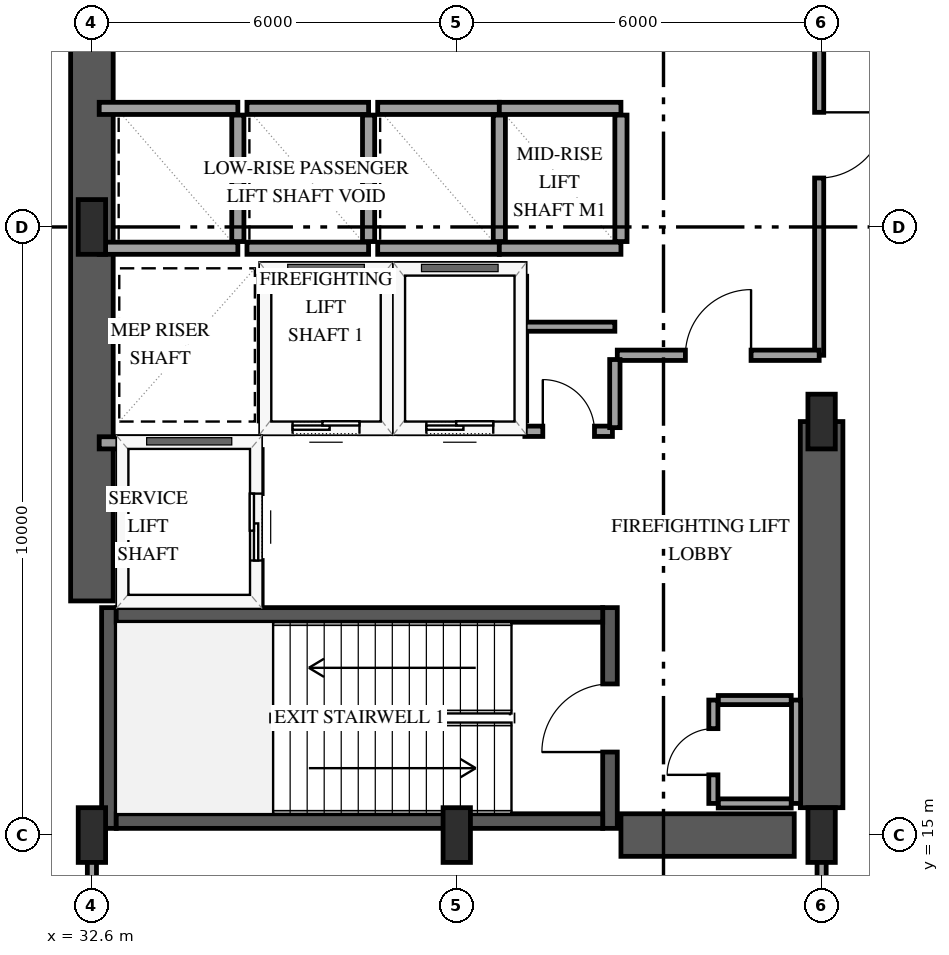
"""IFC4 building model, lengths in metres.
Left out: names, types, materials, properties, quantities, classifications, styles, units other than length and angle.
Written with IfcOpenShell. Run it as: python <this file> out.ifc"""

import sys

from ifc_helpers import new_model, si_unit, direction, frame, frame_2d, origin, origin_2d, place, context, subcontext, project, spatial, rectangle, extrude, element, fill, save


model = new_model("IFC4")
c1 = context("Model", 3, precision=1e-05, world=origin(), true_north=direction((0.0, 1.0)))
c2 = subcontext(c1, "Body", "Model", "MODEL_VIEW")
j1 = project(units=[si_unit("LENGTHUNIT", "METRE"), si_unit("PLANEANGLEUNIT", "RADIAN")], contexts=[c1])
p1 = place(None, origin())
s1 = spatial("IfcSite", under=j1, at=p1, CompositionType="ELEMENT")
p2 = place(p1, origin())
s2 = spatial("IfcBuilding", under=s1, at=p2, CompositionType="ELEMENT")
p3 = place(p2, frame((0.0, 0.0, 25.2)))
s3 = spatial("IfcBuildingStorey", under=s2, at=p3, CompositionType="ELEMENT", Elevation=25.2)
p4 = place(p3, frame((32.88, 15.11, 0.0), z_axis=(0.0, 0.0, 1.0), x_axis=(0.0, 1.0, 0.0)))
e1 = element("IfcWall", 1, at=p4, inside=s3, PredefinedType="SHEAR", context=c2, shape_type="SweptSolid", body=[
    extrude(rectangle(XDim=3.63, YDim=0.24, at=frame_2d((1.815, 0.0))), origin(), (0.0, 0.0, 1.0), 5.4),
])
p5 = place(p3, frame((41.12, 15.11, 0.0), z_axis=(0.0, 0.0, 1.0), x_axis=(0.0, 1.0, 0.0)))
e2 = element("IfcWall", 2, at=p5, inside=s3, PredefinedType="SHEAR", context=c2, shape_type="SweptSolid", body=[
    extrude(rectangle(XDim=3.63, YDim=0.24, at=frame_2d((1.815, 0.0))), origin(), (0.0, 0.0, 1.0), 5.4),
])
p6 = place(p5, frame((1.255, 0.0, 0.0)))
e3 = element("IfcOpeningElement", 3, at=p6, cuts=e2, PredefinedType="OPENING", context=c2, shape_type="SweptSolid", body=[
    extrude(rectangle(XDim=1.12, YDim=2.15, at=frame_2d((0.56, 1.075))), frame((0.0, 0.13, 0.0), z_axis=(0.0, -1.0, 0.0), x_axis=(1.0, 0.0, 0.0)), (0.0, 0.0, 1.0), 0.26),
])
for number, where, z_axis, x_axis in (
    (4, (33.0, 15.23, 0.0), (0.0, 0.0, 1.0), (1.0, 0.0, 0.0)),
    (5, (33.0, 18.62, 0.0), (0.0, 0.0, 1.0), (1.0, 0.0, 0.0)),
):
    element("IfcWall", number, at=place(p3, frame(where, z_axis=z_axis, x_axis=x_axis)), inside=s3, PredefinedType="SHEAR", context=c2, shape_type="SweptSolid", body=[
        extrude(rectangle(XDim=8.0, YDim=0.24, at=frame_2d((4.0, 0.0))), origin(), (0.0, 0.0, 1.0), 5.4),
    ])
p7 = place(p3, frame((32.6, 18.85, 0.0), z_axis=(0.0, 0.0, 1.0), x_axis=(0.0, 1.0, 0.0)))
e6 = element("IfcWall", 6, at=p7, inside=s3, PredefinedType="SHEAR", context=c2, shape_type="SweptSolid", body=[
    extrude(rectangle(XDim=12.3, YDim=0.7, at=frame_2d((6.15, 0.0))), origin(), (0.0, 0.0, 1.0), 5.4),
])
p8 = place(p3, frame((41.3, 15.0, 0.0), z_axis=(0.0, 0.0, 1.0), x_axis=(1.0, 0.0, 0.0)))
e7 = element("IfcWall", 7, at=p8, inside=s3, PredefinedType="SHEAR", context=c2, shape_type="SweptSolid", body=[
    extrude(rectangle(XDim=2.85, YDim=0.7, at=frame_2d((1.425, 0.0))), origin(), (0.0, 0.0, 1.0), 5.4),
])
p9 = place(p3, frame((44.6, 15.45, 0.0), z_axis=(0.0, 0.0, 1.0), x_axis=(0.0, 1.0, 0.0)))
e8 = element("IfcWall", 8, at=p9, inside=s3, PredefinedType="SHEAR", context=c2, shape_type="SweptSolid", body=[
    extrude(rectangle(XDim=6.35, YDim=0.7, at=frame_2d((3.175, 0.0))), origin(), (0.0, 0.0, 1.0), 5.4),
])
for number, where, z_axis, x_axis in (
    (9, (32.6, 15.0, 0.0), (0.0, 0.0, 1.0), (1.0, 0.0, 0.0)),
    (10, (32.6, 25.0, 0.0), (0.0, 0.0, 1.0), (1.0, 0.0, 0.0)),
    (11, (38.6, 15.0, 0.0), (0.0, 0.0, 1.0), (1.0, 0.0, 0.0)),
    (12, (44.6, 15.0, 0.0), (0.0, 0.0, 1.0), (1.0, 0.0, 0.0)),
    (13, (44.6, 21.8, 0.0), (0.0, 0.0, 1.0), (1.0, 0.0, 0.0)),
):
    element("IfcColumn", number, at=place(p3, frame(where, z_axis=z_axis, x_axis=x_axis)), inside=s3, PredefinedType="PILASTER", context=c2, shape_type="SweptSolid", body=[
        extrude(rectangle(XDim=0.45, YDim=0.9, at=origin_2d()), origin(), (0.0, 0.0, 1.0), 5.1),
    ])
p10 = place(p3, frame((35.45, 21.7, 0.0), z_axis=(0.0, 0.0, 1.0), x_axis=(1.0, 0.0, 0.0)))
e14 = element("IfcWall", 14, at=p10, inside=s3, PredefinedType="SOLIDWALL", context=c2, shape_type="SweptSolid", body=[
    extrude(rectangle(XDim=2.0, YDim=0.2, at=frame_2d((1.0, 0.0))), origin(), (0.0, 0.0, 1.0), 5.1),
])
p11 = place(p10, frame((0.45, 0.0, 0.0)))
e15 = element("IfcOpeningElement", 15, at=p11, cuts=e14, PredefinedType="OPENING", context=c2, shape_type="SweptSolid", body=[
    extrude(rectangle(XDim=1.1, YDim=2.15, at=frame_2d((0.55, 1.075))), frame((0.0, 0.11, 0.0), z_axis=(0.0, -1.0, 0.0), x_axis=(1.0, 0.0, 0.0)), (0.0, 0.0, 1.0), 0.22),
])
p12 = place(p3, frame((35.45, 24.3, 0.0), z_axis=(0.0, 0.0, 1.0), x_axis=(1.0, 0.0, 0.0)))
e16 = element("IfcWall", 16, at=p12, inside=s3, PredefinedType="SOLIDWALL", context=c2, shape_type="SweptSolid", body=[
    extrude(rectangle(XDim=2.0, YDim=0.2, at=frame_2d((1.0, 0.0))), origin(), (0.0, 0.0, 1.0), 5.1),
])
for number, where, z_axis, x_axis in (
    (17, (35.45, 21.81, 0.0), (0.0, 0.0, 1.0), (0.0, 1.0, 0.0)),
    (18, (37.45, 21.81, 0.0), (0.0, 0.0, 1.0), (0.0, 1.0, 0.0)),
):
    element("IfcWall", number, at=place(p3, frame(where, z_axis=z_axis, x_axis=x_axis)), inside=s3, PredefinedType="SOLIDWALL", context=c2, shape_type="SweptSolid", body=[
        extrude(rectangle(XDim=2.38, YDim=0.2, at=frame_2d((1.19, 0.0))), origin(), (0.0, 0.0, 1.0), 5.1),
    ])
p13 = place(p3, frame((37.65, 21.7, 0.0), z_axis=(0.0, 0.0, 1.0), x_axis=(1.0, 0.0, 0.0)))
e19 = element("IfcWall", 19, at=p13, inside=s3, PredefinedType="SOLIDWALL", context=c2, shape_type="SweptSolid", body=[
    extrude(rectangle(XDim=2.0, YDim=0.2, at=frame_2d((1.0, 0.0))), origin(), (0.0, 0.0, 1.0), 5.1),
])
p14 = place(p13, frame((0.45, 0.0, 0.0)))
e20 = element("IfcOpeningElement", 20, at=p14, cuts=e19, PredefinedType="OPENING", context=c2, shape_type="SweptSolid", body=[
    extrude(rectangle(XDim=1.1, YDim=2.15, at=frame_2d((0.55, 1.075))), frame((0.0, 0.11, 0.0), z_axis=(0.0, -1.0, 0.0), x_axis=(1.0, 0.0, 0.0)), (0.0, 0.0, 1.0), 0.22),
])
p15 = place(p3, frame((37.65, 24.3, 0.0), z_axis=(0.0, 0.0, 1.0), x_axis=(1.0, 0.0, 0.0)))
e21 = element("IfcWall", 21, at=p15, inside=s3, PredefinedType="SOLIDWALL", context=c2, shape_type="SweptSolid", body=[
    extrude(rectangle(XDim=2.0, YDim=0.2, at=frame_2d((1.0, 0.0))), origin(), (0.0, 0.0, 1.0), 5.1),
])
p16 = place(p3, frame((39.65, 21.81, 0.0), z_axis=(0.0, 0.0, 1.0), x_axis=(0.0, 1.0, 0.0)))
e22 = element("IfcWall", 22, at=p16, inside=s3, PredefinedType="SOLIDWALL", context=c2, shape_type="SweptSolid", body=[
    extrude(rectangle(XDim=2.38, YDim=0.2, at=frame_2d((1.19, 0.0))), origin(), (0.0, 0.0, 1.0), 5.1),
])
p17 = place(p3, frame((32.72, 21.45, 0.0), z_axis=(0.0, 0.0, 1.0), x_axis=(1.0, 0.0, 0.0)))
e23 = element("IfcWall", 23, at=p17, inside=s3, PredefinedType="SOLIDWALL", context=c2, shape_type="SweptSolid", body=[
    extrude(rectangle(XDim=2.58, YDim=0.2, at=frame_2d((1.29, 0.0))), origin(), (0.0, 0.0, 1.0), 5.1),
])
p18 = place(p3, frame((35.3, 18.79, 0.0), z_axis=(0.0, 0.0, 1.0), x_axis=(0.0, 1.0, 0.0)))
e24 = element("IfcWall", 24, at=p18, inside=s3, PredefinedType="SOLIDWALL", context=c2, shape_type="SweptSolid", body=[
    extrude(rectangle(XDim=2.55, YDim=0.2, at=frame_2d((1.275, 0.0))), origin(), (0.0, 0.0, 1.0), 5.1),
])
p19 = place(p18, frame((0.725, 0.0, 0.0)))
e25 = element("IfcOpeningElement", 25, at=p19, cuts=e24, PredefinedType="OPENING", context=c2, shape_type="SweptSolid", body=[
    extrude(rectangle(XDim=1.1, YDim=2.15, at=frame_2d((0.55, 1.075))), frame((0.0, 0.11, 0.0), z_axis=(0.0, -1.0, 0.0), x_axis=(1.0, 0.0, 0.0)), (0.0, 0.0, 1.0), 0.22),
])
for number, where, z_axis, x_axis in (
    (26, (32.72, 24.65, 0.0), (0.0, 0.0, 1.0), (1.0, 0.0, 0.0)),
    (27, (32.72, 26.95, 0.0), (0.0, 0.0, 1.0), (1.0, 0.0, 0.0)),
):
    element("IfcWall", number, at=place(p3, frame(where, z_axis=z_axis, x_axis=x_axis)), inside=s3, PredefinedType="SOLIDWALL", context=c2, shape_type="SweptSolid", body=[
        extrude(rectangle(XDim=2.28, YDim=0.2, at=frame_2d((1.14, 0.0))), origin(), (0.0, 0.0, 1.0), 5.1),
    ])
p20 = place(p3, frame((35.0, 24.76, 0.0), z_axis=(0.0, 0.0, 1.0), x_axis=(0.0, 1.0, 0.0)))
e28 = element("IfcWall", 28, at=p20, inside=s3, PredefinedType="SOLIDWALL", context=c2, shape_type="SweptSolid", body=[
    extrude(rectangle(XDim=2.08, YDim=0.2, at=frame_2d((1.04, 0.0))), origin(), (0.0, 0.0, 1.0), 5.1),
])
for number, where, z_axis, x_axis in (
    (29, (35.15, 24.65, 0.0), (0.0, 0.0, 1.0), (1.0, 0.0, 0.0)),
    (30, (35.15, 26.95, 0.0), (0.0, 0.0, 1.0), (1.0, 0.0, 0.0)),
):
    element("IfcWall", number, at=place(p3, frame(where, z_axis=z_axis, x_axis=x_axis)), inside=s3, PredefinedType="SOLIDWALL", context=c2, shape_type="SweptSolid", body=[
        extrude(rectangle(XDim=2.0, YDim=0.2, at=frame_2d((1.0, 0.0))), origin(), (0.0, 0.0, 1.0), 5.1),
    ])
p21 = place(p3, frame((37.15, 24.76, 0.0), z_axis=(0.0, 0.0, 1.0), x_axis=(0.0, 1.0, 0.0)))
e31 = element("IfcWall", 31, at=p21, inside=s3, PredefinedType="SOLIDWALL", context=c2, shape_type="SweptSolid", body=[
    extrude(rectangle(XDim=2.08, YDim=0.2, at=frame_2d((1.04, 0.0))), origin(), (0.0, 0.0, 1.0), 5.1),
])
for number, where, z_axis, x_axis in (
    (32, (37.3, 24.65, 0.0), (0.0, 0.0, 1.0), (1.0, 0.0, 0.0)),
    (33, (37.3, 26.95, 0.0), (0.0, 0.0, 1.0), (1.0, 0.0, 0.0)),
):
    element("IfcWall", number, at=place(p3, frame(where, z_axis=z_axis, x_axis=x_axis)), inside=s3, PredefinedType="SOLIDWALL", context=c2, shape_type="SweptSolid", body=[
        extrude(rectangle(XDim=2.0, YDim=0.2, at=frame_2d((1.0, 0.0))), origin(), (0.0, 0.0, 1.0), 5.1),
    ])
p22 = place(p3, frame((39.3, 24.76, 0.0), z_axis=(0.0, 0.0, 1.0), x_axis=(0.0, 1.0, 0.0)))
e34 = element("IfcWall", 34, at=p22, inside=s3, PredefinedType="SOLIDWALL", context=c2, shape_type="SweptSolid", body=[
    extrude(rectangle(XDim=2.08, YDim=0.2, at=frame_2d((1.04, 0.0))), origin(), (0.0, 0.0, 1.0), 5.1),
])
for number, where, z_axis, x_axis in (
    (35, (39.3, 24.65, 0.0), (0.0, 0.0, 1.0), (1.0, 0.0, 0.0)),
    (36, (39.3, 26.95, 0.0), (0.0, 0.0, 1.0), (1.0, 0.0, 0.0)),
):
    element("IfcWall", number, at=place(p3, frame(where, z_axis=z_axis, x_axis=x_axis)), inside=s3, PredefinedType="SOLIDWALL", context=c2, shape_type="SweptSolid", body=[
        extrude(rectangle(XDim=2.0, YDim=0.2, at=frame_2d((1.0, 0.0))), origin(), (0.0, 0.0, 1.0), 5.1),
    ])
p23 = place(p3, frame((41.3, 24.76, 0.0), z_axis=(0.0, 0.0, 1.0), x_axis=(0.0, 1.0, 0.0)))
e37 = element("IfcWall", 37, at=p23, inside=s3, PredefinedType="SOLIDWALL", context=c2, shape_type="SweptSolid", body=[
    extrude(rectangle(XDim=2.08, YDim=0.2, at=frame_2d((1.04, 0.0))), origin(), (0.0, 0.0, 1.0), 5.1),
])
for number, where, z_axis, x_axis in (
    (38, (42.9, 15.52, 0.0), (0.0, 0.0, 1.0), (1.0, 0.0, 0.0)),
    (39, (42.9, 17.22, 0.0), (0.0, 0.0, 1.0), (1.0, 0.0, 0.0)),
):
    element("IfcWall", number, at=place(p3, frame(where, z_axis=z_axis, x_axis=x_axis)), inside=s3, PredefinedType="PARTITIONING", context=c2, shape_type="SweptSolid", body=[
        extrude(rectangle(XDim=1.2, YDim=0.15, at=frame_2d((0.6, 0.0))), origin(), (0.0, 0.0, 1.0), 5.1),
    ])
p24 = place(p3, frame((44.18, 15.52, 0.0), z_axis=(0.0, 0.0, 1.0), x_axis=(0.0, 1.0, 0.0)))
e40 = element("IfcWall", 40, at=p24, inside=s3, PredefinedType="PARTITIONING", context=c2, shape_type="SweptSolid", body=[
    extrude(rectangle(XDim=1.7, YDim=0.15, at=frame_2d((0.85, 0.0))), origin(), (0.0, 0.0, 1.0), 5.1),
])
p25 = place(p3, frame((42.82, 15.52, 0.0), z_axis=(0.0, 0.0, 1.0), x_axis=(0.0, 1.0, 0.0)))
e41 = element("IfcWall", 41, at=p25, inside=s3, PredefinedType="PARTITIONING", context=c2, shape_type="SweptSolid", body=[
    extrude(rectangle(XDim=1.7, YDim=0.15, at=frame_2d((0.85, 0.0))), origin(), (0.0, 0.0, 1.0), 5.1),
])
p26 = place(p25, frame((0.47, 0.0, 0.0)))
e42 = element("IfcOpeningElement", 42, at=p26, cuts=e41, PredefinedType="OPENING", context=c2, shape_type="SweptSolid", body=[
    extrude(rectangle(XDim=0.76, YDim=2.0, at=frame_2d((0.38, 1.0))), frame((0.0, 0.085, 0.0), z_axis=(0.0, -1.0, 0.0), x_axis=(1.0, 0.0, 0.0)), (0.0, 0.0, 1.0), 0.17),
])
p27 = place(p3, frame((44.56, 29.8, 0.0), z_axis=(0.0, 0.0, 1.0), x_axis=(0.0, -1.0, 0.0)))
e43 = element("IfcWall", 43, at=p27, inside=s3, PredefinedType="PARTITIONING", context=c2, shape_type="SweptSolid", body=[
    extrude(rectangle(XDim=6.91, YDim=0.15, at=frame_2d((3.455, 0.0))), origin(), (0.0, 0.0, 1.0), 4.14),
])
p28 = place(p27, frame((2.915, 0.0, 0.0)))
e44 = element("IfcOpeningElement", 44, at=p28, cuts=e43, PredefinedType="OPENING", context=c2, shape_type="SweptSolid", body=[
    extrude(rectangle(XDim=1.08, YDim=2.15, at=frame_2d((0.54, 1.075))), frame((0.0, 0.085, 0.0), z_axis=(0.0, -1.0, 0.0), x_axis=(1.0, 0.0, 0.0)), (0.0, 0.0, 1.0), 0.17),
])
p29 = place(p3, frame((41.24, 22.89, 0.0), z_axis=(0.0, 0.0, 1.0), x_axis=(1.0, 0.0, 0.0)))
e45 = element("IfcWall", 45, at=p29, inside=s3, PredefinedType="PARTITIONING", context=c2, shape_type="SweptSolid", body=[
    extrude(rectangle(XDim=3.32, YDim=0.17, at=frame_2d((1.66, 0.0))), origin(), (0.0, 0.0, 1.0), 5.1),
])
p30 = place(p29, frame((1.12, 0.0, 0.0)))
e46 = element("IfcOpeningElement", 46, at=p30, cuts=e45, PredefinedType="OPENING", context=c2, shape_type="SweptSolid", body=[
    extrude(rectangle(XDim=1.08, YDim=2.15, at=frame_2d((0.54, 1.075))), frame((0.0, 0.095, 0.0), z_axis=(0.0, -1.0, 0.0), x_axis=(1.0, 0.0, 0.0)), (0.0, 0.0, 1.0), 0.19),
])
p31 = place(p3, frame((44.6, 11.87, 0.0), z_axis=(0.0, 0.0, 1.0), x_axis=(0.0, 1.0, 0.0)))
e47 = element("IfcWall", 47, at=p31, inside=s3, PredefinedType="PARTITIONING", context=c2, shape_type="SweptSolid", body=[
    extrude(rectangle(XDim=3.06, YDim=0.15, at=frame_2d((1.53, 0.0))), origin(), (0.0, 0.0, 1.0), 4.222),
])
p32 = place(p3, frame((39.72, 21.64, 0.0), z_axis=(0.0, 0.0, 1.0), x_axis=(1.0, 0.0, 0.0)))
e48 = element("IfcWall", 48, at=p32, inside=s3, PredefinedType="PARTITIONING", context=c2, shape_type="SweptSolid", body=[
    extrude(rectangle(XDim=1.44, YDim=0.17, at=frame_2d((0.72, 0.0))), origin(), (0.0, 0.0, 1.0), 5.1),
])
p33 = place(p32, frame((0.295, 0.0, 0.0)))
e49 = element("IfcOpeningElement", 49, at=p33, cuts=e48, PredefinedType="OPENING", context=c2, shape_type="SweptSolid", body=[
    extrude(rectangle(XDim=0.85, YDim=2.1, at=frame_2d((0.425, 1.05))), frame((0.0, 0.095, 0.0), z_axis=(0.0, -1.0, 0.0), x_axis=(1.0, 0.0, 0.0)), (0.0, 0.0, 1.0), 0.19),
])
p34 = place(p3, frame((41.2, 21.7, 0.0), z_axis=(0.0, 0.0, 1.0), x_axis=(0.0, 1.0, 0.0)))
e50 = element("IfcWall", 50, at=p34, inside=s3, PredefinedType="PARTITIONING", context=c2, shape_type="SweptSolid", body=[
    extrude(rectangle(XDim=1.12, YDim=0.17, at=frame_2d((0.56, 0.0))), origin(), (0.0, 0.0, 1.0), 5.1),
])
p35 = place(p3, frame((32.6, 14.93, 0.0), z_axis=(0.0, 0.0, 1.0), x_axis=(0.0, -1.0, 0.0)))
e51 = element("IfcWall", 51, at=p35, inside=s3, PredefinedType="PARTITIONING", context=c2, shape_type="SweptSolid", body=[
    extrude(rectangle(XDim=1.723, YDim=0.15, at=frame_2d((0.861, 0.0))), origin(), (0.0, 0.0, 1.0), 4.222),
])
p36 = place(p3, frame((41.2, 23.36, 0.0), z_axis=(0.0, 0.0, 1.0), x_axis=(-1.0, 0.0, 0.0)))
e52 = element("IfcWall", 52, at=p36, inside=s3, PredefinedType="PARTITIONING", context=c2, shape_type="SweptSolid", body=[
    extrude(rectangle(XDim=1.48, YDim=0.15, at=frame_2d((0.74, 0.0))), origin(), (0.0, 0.0, 1.0), 5.1),
])
p37 = place(p11, origin())
e53 = element("IfcDoor", 53, at=p37, inside=s3, OperationType="SLIDING_TO_LEFT", PredefinedType="DOOR", context=c2, shape_type="SweptSolid", body=[
    extrude(rectangle(XDim=1.1, YDim=2.15, at=frame_2d((0.55, 1.075))), frame((0.0, 0.025, 0.0), z_axis=(0.0, -1.0, 0.0), x_axis=(1.0, 0.0, 0.0)), (0.0, 0.0, 1.0), 0.05),
])
fill(e15, e53)
p38 = place(p14, origin())
e54 = element("IfcDoor", 54, at=p38, inside=s3, OperationType="SLIDING_TO_LEFT", PredefinedType="DOOR", context=c2, shape_type="SweptSolid", body=[
    extrude(rectangle(XDim=1.1, YDim=2.15, at=frame_2d((0.55, 1.075))), frame((0.0, 0.025, 0.0), z_axis=(0.0, -1.0, 0.0), x_axis=(1.0, 0.0, 0.0)), (0.0, 0.0, 1.0), 0.05),
])
fill(e20, e54)
p39 = place(p19, origin())
e55 = element("IfcDoor", 55, at=p39, inside=s3, OperationType="SLIDING_TO_LEFT", PredefinedType="DOOR", context=c2, shape_type="SweptSolid", body=[
    extrude(rectangle(XDim=1.1, YDim=2.15, at=frame_2d((0.55, 1.075))), frame((0.0, 0.025, 0.0), z_axis=(0.0, -1.0, 0.0), x_axis=(1.0, 0.0, 0.0)), (0.0, 0.0, 1.0), 0.05),
])
fill(e25, e55)
p40 = place(p6, origin())
e56 = element("IfcDoor", 56, at=p40, inside=s3, OperationType="SINGLE_SWING_LEFT", PredefinedType="DOOR", context=c2, shape_type="SweptSolid", body=[
    extrude(rectangle(XDim=1.12, YDim=2.15, at=frame_2d((0.56, 1.075))), frame((0.0, 0.025, 0.0), z_axis=(0.0, -1.0, 0.0), x_axis=(1.0, 0.0, 0.0)), (0.0, 0.0, 1.0), 0.05),
])
fill(e3, e56)
p41 = place(p26, origin())
e57 = element("IfcDoor", 57, at=p41, inside=s3, OperationType="SINGLE_SWING_LEFT", PredefinedType="TRAPDOOR", context=c2, shape_type="SweptSolid", body=[
    extrude(rectangle(XDim=0.76, YDim=2.0, at=frame_2d((0.38, 1.0))), frame((0.0, 0.025, 0.0), z_axis=(0.0, -1.0, 0.0), x_axis=(1.0, 0.0, 0.0)), (0.0, 0.0, 1.0), 0.05),
])
fill(e42, e57)
p42 = place(p28, origin())
e58 = element("IfcDoor", 58, at=p42, inside=s3, OperationType="SINGLE_SWING_LEFT", PredefinedType="DOOR", context=c2, shape_type="SweptSolid", body=[
    extrude(rectangle(XDim=1.08, YDim=2.15, at=frame_2d((0.54, 1.075))), frame((0.0, 0.025, 0.0), z_axis=(0.0, -1.0, 0.0), x_axis=(1.0, 0.0, 0.0)), (0.0, 0.0, 1.0), 0.05),
])
fill(e44, e58)
p43 = place(p30, origin())
e59 = element("IfcDoor", 59, at=p43, inside=s3, OperationType="SINGLE_SWING_RIGHT", PredefinedType="DOOR", context=c2, shape_type="SweptSolid", body=[
    extrude(rectangle(XDim=1.08, YDim=2.15, at=frame_2d((0.54, 1.075))), frame((0.0, 0.025, 0.0), z_axis=(0.0, -1.0, 0.0), x_axis=(1.0, 0.0, 0.0)), (0.0, 0.0, 1.0), 0.05),
])
fill(e46, e59)
p44 = place(p33, origin())
e60 = element("IfcDoor", 60, at=p44, inside=s3, OperationType="SINGLE_SWING_LEFT", PredefinedType="DOOR", context=c2, shape_type="SweptSolid", body=[
    extrude(rectangle(XDim=0.85, YDim=2.1, at=frame_2d((0.425, 1.05))), frame((0.0, 0.025, 0.0), z_axis=(0.0, -1.0, 0.0), x_axis=(1.0, 0.0, 0.0)), (0.0, 0.0, 1.0), 0.05),
])
fill(e49, e60)
save(model, sys.argv[1])
